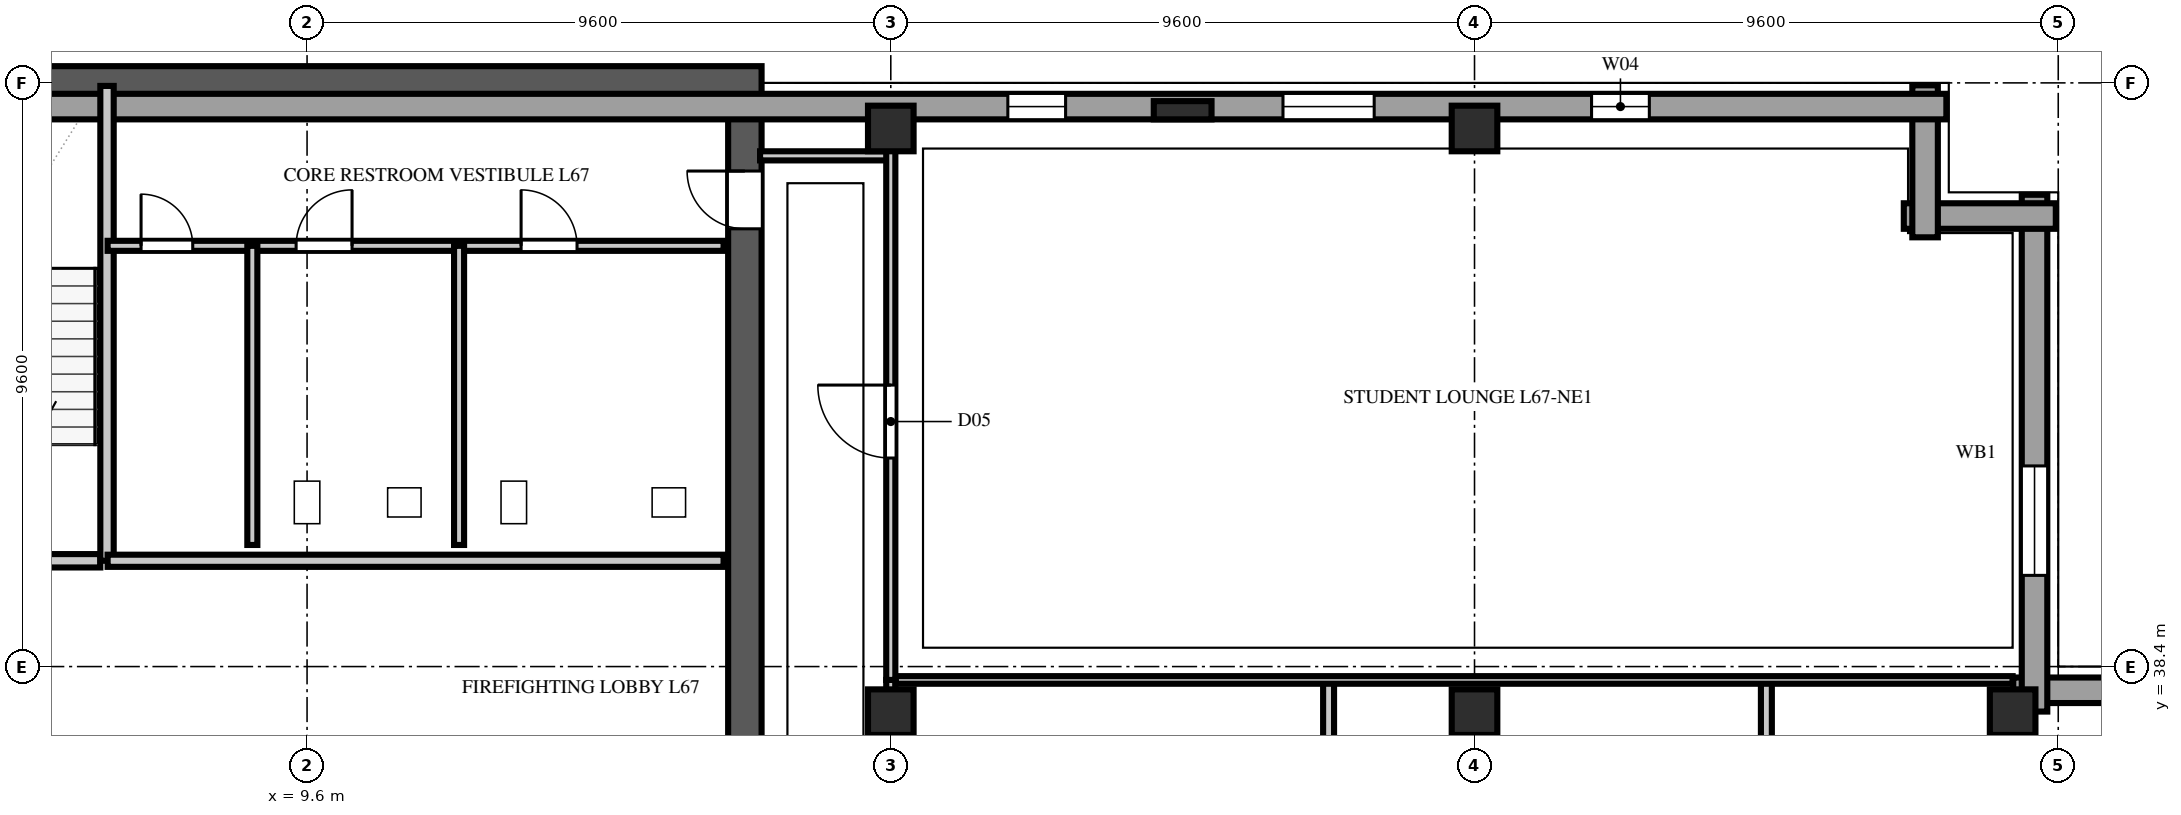
"""IFC4 building model, lengths in metres.
Left out: names, types, materials, properties, quantities, classifications, styles, units other than length and angle.
Written with IfcOpenShell. Run it as: python <this file> out.ifc"""

import sys

from ifc_helpers import new_model, si_unit, direction, frame, frame_2d, origin, origin_2d, place, context, subcontext, project, spatial, rectangle, extrude, element, fill, save


model = new_model("IFC4")
c1 = context("Model", 3, precision=1e-05, world=origin(), true_north=direction((0.0, 1.0)))
c2 = subcontext(c1, "Body", "Model", "MODEL_VIEW")
j1 = project(units=[si_unit("LENGTHUNIT", "METRE"), si_unit("PLANEANGLEUNIT", "RADIAN")], contexts=[c1])
p1 = place(None, origin())
s1 = spatial("IfcSite", under=j1, at=p1, CompositionType="ELEMENT")
p2 = place(p1, origin())
s2 = spatial("IfcBuilding", under=s1, at=p2, CompositionType="ELEMENT")
p3 = place(p2, frame((0.0, 0.0, 265.8)))
s3 = spatial("IfcBuildingStorey", under=s2, at=p3, CompositionType="ELEMENT", Elevation=265.8)
p4 = place(p3, frame((2.475, 48.0, 0.0), z_axis=(0.0, 0.0, 1.0), x_axis=(1.0, 0.0, 0.0)))
e1 = element("IfcWall", 1, at=p4, inside=s3, PredefinedType="SHEAR", context=c2, shape_type="SweptSolid", body=[
    extrude(rectangle(XDim=14.6, YDim=0.55, at=frame_2d((7.3, 0.0))), origin(), (0.0, 0.0, 1.0), 3.54),
])
p5 = place(p3, frame((16.8, 36.4, 0.0), z_axis=(0.0, 0.0, 1.0), x_axis=(0.0, 1.0, 0.0)))
e2 = element("IfcWall", 2, at=p5, inside=s3, PredefinedType="SHEAR", context=c2, shape_type="SweptSolid", body=[
    extrude(rectangle(XDim=11.325, YDim=0.55, at=frame_2d((5.663, 0.0))), origin(), (0.0, 0.0, 1.0), 3.54),
])
p6 = place(p5, frame((9.2, 0.0, 0.0)))
e3 = element("IfcOpeningElement", 3, at=p6, cuts=e2, PredefinedType="OPENING", context=c2, shape_type="SweptSolid", body=[
    extrude(rectangle(XDim=0.95, YDim=2.15, at=frame_2d((0.475, 1.075))), frame((0.0, 0.287, 0.0), z_axis=(0.0, -1.0, 0.0), x_axis=(1.0, 0.0, 0.0)), (0.0, 0.0, 1.0), 0.574),
])
for number, where, z_axis, x_axis in (
    (4, (19.2, 37.65, 0.0), (0.0, 0.0, 1.0), (1.0, 0.0, 0.0)),
    (5, (19.2, 47.25, 0.0), (0.0, 0.0, 1.0), (1.0, 0.0, 0.0)),
    (6, (28.8, 37.65, 0.0), (0.0, 0.0, 1.0), (1.0, 0.0, 0.0)),
    (7, (28.8, 47.25, 0.0), (0.0, 0.0, 1.0), (1.0, 0.0, 0.0)),
    (8, (37.65, 37.65, 0.0), (0.0, 0.0, 1.0), (1.0, 0.0, 0.0)),
):
    element("IfcColumn", number, at=place(p3, frame(where, z_axis=z_axis, x_axis=x_axis)), inside=s3, PredefinedType="COLUMN", context=c2, shape_type="SweptSolid", body=[
        extrude(rectangle(XDim=0.75, YDim=0.75, at=origin_2d()), origin(), (0.0, 0.0, 1.0), 3.8),
    ])
p7 = place(p3, frame((24.0, 47.55, 0.0), z_axis=(0.0, 0.0, 1.0), x_axis=(1.0, 0.0, 0.0)))
e9 = element("IfcColumn", 9, at=p7, inside=s3, PredefinedType="PILASTER", context=c2, shape_type="SweptSolid", body=[
    extrude(rectangle(XDim=0.95, YDim=0.3, at=origin_2d()), origin(), (0.0, 0.0, 1.0), 3.8),
])
p8 = place(p3, frame((46.16, 38.01, 0.0), z_axis=(0.0, 0.0, 1.0), x_axis=(-1.0, 0.0, 0.0)))
e10 = element("IfcWall", 10, at=p8, inside=s3, PredefinedType="SOLIDWALL", context=c2, shape_type="SweptSolid", body=[
    extrude(rectangle(XDim=8.5, YDim=0.42, at=frame_2d((4.25, 0.0))), origin(), (0.0, 0.0, 1.0), 3.54),
])
p9 = place(p8, frame((4.46, 0.0, 0.85)))
e11 = element("IfcOpeningElement", 11, at=p9, cuts=e10, PredefinedType="OPENING", context=c2, shape_type="SweptSolid", body=[
    extrude(rectangle(XDim=1.8, YDim=1.85, at=frame_2d((0.9, 0.925))), frame((0.0, 0.222, 0.0), z_axis=(0.0, -1.0, 0.0), x_axis=(1.0, 0.0, 0.0)), (0.0, 0.0, 1.0), 0.444),
])
p10 = place(p3, frame((38.01, 37.66, 0.0), z_axis=(0.0, 0.0, 1.0), x_axis=(0.0, 1.0, 0.0)))
e12 = element("IfcWall", 12, at=p10, inside=s3, PredefinedType="SOLIDWALL", context=c2, shape_type="SweptSolid", body=[
    extrude(rectangle(XDim=8.5, YDim=0.42, at=frame_2d((4.25, 0.0))), origin(), (0.0, 0.0, 1.0), 3.54),
])
p11 = place(p10, frame((2.24, 0.0, 0.85)))
e13 = element("IfcOpeningElement", 13, at=p11, cuts=e12, PredefinedType="OPENING", context=c2, shape_type="SweptSolid", body=[
    extrude(rectangle(XDim=1.8, YDim=1.85, at=frame_2d((0.9, 0.925))), frame((0.0, 0.222, 0.0), z_axis=(0.0, -1.0, 0.0), x_axis=(1.0, 0.0, 0.0)), (0.0, 0.0, 1.0), 0.444),
])
for number, where, z_axis, x_axis in (
    (14, (38.36, 45.81, 0.0), (0.0, 0.0, 1.0), (-1.0, 0.0, 0.0)),
    (15, (36.21, 45.46, 0.0), (0.0, 0.0, 1.0), (0.0, 1.0, 0.0)),
):
    element("IfcWall", number, at=place(p3, frame(where, z_axis=z_axis, x_axis=x_axis)), inside=s3, PredefinedType="SOLIDWALL", context=c2, shape_type="SweptSolid", body=[
        extrude(rectangle(XDim=2.5, YDim=0.42, at=frame_2d((1.25, 0.0))), origin(), (0.0, 0.0, 1.0), 3.54),
    ])
p12 = place(p3, frame((36.56, 47.61, 0.0), z_axis=(0.0, 0.0, 1.0), x_axis=(-1.0, 0.0, 0.0)))
e16 = element("IfcWall", 16, at=p12, inside=s3, PredefinedType="SOLIDWALL", context=c2, shape_type="SweptSolid", body=[
    extrude(rectangle(XDim=34.085, YDim=0.42, at=frame_2d((17.042, 0.0))), origin(), (0.0, 0.0, 1.0), 3.54),
])
p13 = place(p12, frame((4.885, 0.0, 0.9)))
e17 = element("IfcOpeningElement", 17, at=p13, cuts=e16, PredefinedType="OPENING", context=c2, shape_type="SweptSolid", body=[
    extrude(rectangle(XDim=0.95, YDim=1.85, at=frame_2d((0.475, 0.925))), frame((0.0, 0.222, 0.0), z_axis=(0.0, -1.0, 0.0), x_axis=(1.0, 0.0, 0.0)), (0.0, 0.0, 1.0), 0.444),
])
p14 = place(p12, frame((9.41, 0.0, 0.9)))
e18 = element("IfcOpeningElement", 18, at=p14, cuts=e16, PredefinedType="OPENING", context=c2, shape_type="SweptSolid", body=[
    extrude(rectangle(XDim=1.5, YDim=1.85, at=frame_2d((0.75, 0.925))), frame((0.0, 0.222, 0.0), z_axis=(0.0, -1.0, 0.0), x_axis=(1.0, 0.0, 0.0)), (0.0, 0.0, 1.0), 0.444),
])
p15 = place(p12, frame((14.485, 0.0, 0.9)))
e19 = element("IfcOpeningElement", 19, at=p15, cuts=e16, PredefinedType="OPENING", context=c2, shape_type="SweptSolid", body=[
    extrude(rectangle(XDim=0.95, YDim=1.85, at=frame_2d((0.475, 0.925))), frame((0.0, 0.222, 0.0), z_axis=(0.0, -1.0, 0.0), x_axis=(1.0, 0.0, 0.0)), (0.0, 0.0, 1.0), 0.444),
])
p16 = place(p3, frame((2.65, 40.14, 0.0), z_axis=(0.0, 0.0, 1.0), x_axis=(1.0, 0.0, 0.0)))
e20 = element("IfcWall", 20, at=p16, inside=s3, PredefinedType="SOLIDWALL", context=c2, shape_type="SweptSolid", body=[
    extrude(rectangle(XDim=3.55, YDim=0.22, at=frame_2d((1.775, 0.0))), origin(), (0.0, 0.0, 1.0), 3.54),
])
p17 = place(p16, frame((1.2, 0.0, 0.0)))
e21 = element("IfcOpeningElement", 21, at=p17, cuts=e20, PredefinedType="OPENING", context=c2, shape_type="SweptSolid", body=[
    extrude(rectangle(XDim=1.1, YDim=2.2, at=frame_2d((0.55, 1.1))), frame((0.0, 0.122, 0.0), z_axis=(0.0, -1.0, 0.0), x_axis=(1.0, 0.0, 0.0)), (0.0, 0.0, 1.0), 0.244),
])
p18 = place(p3, frame((6.31, 40.14, 0.0), z_axis=(0.0, 0.0, 1.0), x_axis=(0.0, 1.0, 0.0)))
e22 = element("IfcWall", 22, at=p18, inside=s3, PredefinedType="SOLIDWALL", context=c2, shape_type="SweptSolid", body=[
    extrude(rectangle(XDim=7.81, YDim=0.22, at=frame_2d((3.905, 0.0))), origin(), (0.0, 0.0, 1.0), 3.54),
])
p19 = place(p3, frame((6.32, 40.14, 0.0), z_axis=(0.0, 0.0, 1.0), x_axis=(1.0, 0.0, 0.0)))
e23 = element("IfcWall", 23, at=p19, inside=s3, PredefinedType="SOLIDWALL", context=c2, shape_type="SweptSolid", body=[
    extrude(rectangle(XDim=10.13, YDim=0.2, at=frame_2d((5.065, 0.0))), origin(), (0.0, 0.0, 1.0), 3.54),
])
p20 = place(p3, frame((6.32, 45.32, 0.0), z_axis=(0.0, 0.0, 1.0), x_axis=(1.0, 0.0, 0.0)))
e24 = element("IfcWall", 24, at=p20, inside=s3, PredefinedType="PLUMBINGWALL", context=c2, shape_type="SweptSolid", body=[
    extrude(rectangle(XDim=10.13, YDim=0.165, at=frame_2d((5.065, 0.0))), origin(), (0.0, 0.0, 1.0), 3.54),
])
p21 = place(p20, frame((0.55, 0.0, 0.0)))
e25 = element("IfcOpeningElement", 25, at=p21, cuts=e24, PredefinedType="OPENING", context=c2, shape_type="SweptSolid", body=[
    extrude(rectangle(XDim=0.85, YDim=2.1, at=frame_2d((0.425, 1.05))), frame((0.0, 0.094, 0.0), z_axis=(0.0, -1.0, 0.0), x_axis=(1.0, 0.0, 0.0)), (0.0, 0.0, 1.0), 0.189),
])
p22 = place(p20, frame((3.1, 0.0, 0.0)))
e26 = element("IfcOpeningElement", 26, at=p22, cuts=e24, PredefinedType="OPENING", context=c2, shape_type="SweptSolid", body=[
    extrude(rectangle(XDim=0.92, YDim=2.15, at=frame_2d((0.46, 1.075))), frame((0.0, 0.094, 0.0), z_axis=(0.0, -1.0, 0.0), x_axis=(1.0, 0.0, 0.0)), (0.0, 0.0, 1.0), 0.189),
])
p23 = place(p20, frame((6.8, 0.0, 0.0)))
e27 = element("IfcOpeningElement", 27, at=p23, cuts=e24, PredefinedType="OPENING", context=c2, shape_type="SweptSolid", body=[
    extrude(rectangle(XDim=0.92, YDim=2.15, at=frame_2d((0.46, 1.075))), frame((0.0, 0.094, 0.0), z_axis=(0.0, -1.0, 0.0), x_axis=(1.0, 0.0, 0.0)), (0.0, 0.0, 1.0), 0.189),
])
for number, where, z_axis, x_axis in (
    (28, (8.7, 40.4, 0.0), (0.0, 0.0, 1.0), (0.0, 1.0, 0.0)),
    (29, (12.1, 40.4, 0.0), (0.0, 0.0, 1.0), (0.0, 1.0, 0.0)),
):
    element("IfcWall", number, at=place(p3, frame(where, z_axis=z_axis, x_axis=x_axis)), inside=s3, PredefinedType="PLUMBINGWALL", context=c2, shape_type="SweptSolid", body=[
        extrude(rectangle(XDim=4.92, YDim=0.165, at=frame_2d((2.46, 0.0))), origin(), (0.0, 0.0, 1.0), 3.54),
    ])
p24 = place(p3, frame((17.05, 46.8, 0.0), z_axis=(0.0, 0.0, 1.0), x_axis=(1.0, 0.0, 0.0)))
e30 = element("IfcWall", 30, at=p24, inside=s3, PredefinedType="PARTITIONING", context=c2, shape_type="SweptSolid", body=[
    extrude(rectangle(XDim=2.15, YDim=0.15, at=frame_2d((1.075, 0.0))), origin(), (0.0, 0.0, 1.0), 3.54),
])
for number, where, z_axis, x_axis in (
    (31, (26.4, 20.95, 0.0), (0.0, 0.0, 1.0), (0.0, 1.0, 0.0)),
    (32, (33.6, 20.95, 0.0), (0.0, 0.0, 1.0), (0.0, 1.0, 0.0)),
):
    element("IfcWall", number, at=place(p3, frame(where, z_axis=z_axis, x_axis=x_axis)), inside=s3, PredefinedType="PARTITIONING", context=c2, shape_type="SweptSolid", body=[
        extrude(rectangle(XDim=17.23, YDim=0.18, at=frame_2d((8.615, 0.0))), origin(), (0.0, 0.0, 1.0), 3.54),
    ])
p25 = place(p3, frame((19.2, 20.95, 0.0), z_axis=(0.0, 0.0, 1.0), x_axis=(0.0, 1.0, 0.0)))
e33 = element("IfcWall", 33, at=p25, inside=s3, PredefinedType="PARTITIONING", context=c2, shape_type="SweptSolid", body=[
    extrude(rectangle(XDim=17.23, YDim=0.15, at=frame_2d((8.615, 0.0))), origin(), (0.0, 0.0, 1.0), 3.123),
])
p26 = place(p3, frame((19.28, 38.18, 0.0), z_axis=(0.0, 0.0, 1.0), x_axis=(1.0, 0.0, 0.0)))
e34 = element("IfcWall", 34, at=p26, inside=s3, PredefinedType="PARTITIONING", context=c2, shape_type="SweptSolid", body=[
    extrude(rectangle(XDim=18.37, YDim=0.125, at=frame_2d((9.185, 0.0))), origin(), (0.0, 0.0, 1.0), 3.54),
])
p27 = place(p3, frame((19.2, 38.18, 0.0), z_axis=(0.0, 0.0, 1.0), x_axis=(0.0, 1.0, 0.0)))
e35 = element("IfcWall", 35, at=p27, inside=s3, PredefinedType="PARTITIONING", context=c2, shape_type="SweptSolid", body=[
    extrude(rectangle(XDim=9.27, YDim=0.15, at=frame_2d((4.635, 0.0))), origin(), (0.0, 0.0, 1.0), 3.123),
])
p28 = place(p27, frame((3.65, 0.0, 0.0)))
e36 = element("IfcOpeningElement", 36, at=p28, cuts=e35, PredefinedType="OPENING", context=c2, shape_type="SweptSolid", body=[
    extrude(rectangle(XDim=1.2, YDim=2.2, at=frame_2d((0.6, 1.1))), frame((0.0, 0.087, 0.0), z_axis=(0.0, -1.0, 0.0), x_axis=(1.0, 0.0, 0.0)), (0.0, 0.0, 1.0), 0.174),
])
p29 = place(p11, origin())
e37 = element("IfcWindow", 37, at=p29, inside=s3, PartitioningType="DOUBLE_PANEL_VERTICAL", PredefinedType="WINDOW", context=c2, shape_type="SweptSolid", body=[
    extrude(rectangle(XDim=1.8, YDim=1.85, at=frame_2d((0.9, 0.925))), frame((0.0, 0.11, 0.0), z_axis=(0.0, -1.0, 0.0), x_axis=(1.0, 0.0, 0.0)), (0.0, 0.0, 1.0), 0.06),
])
fill(e13, e37)
p30 = place(p13, origin())
e38 = element("IfcWindow", 38, at=p30, inside=s3, PartitioningType="SINGLE_PANEL", PredefinedType="WINDOW", context=c2, shape_type="SweptSolid", body=[
    extrude(rectangle(XDim=0.95, YDim=1.85, at=frame_2d((0.475, 0.925))), frame((0.0, 0.11, 0.0), z_axis=(0.0, -1.0, 0.0), x_axis=(1.0, 0.0, 0.0)), (0.0, 0.0, 1.0), 0.06),
])
fill(e17, e38)
p31 = place(p14, origin())
e39 = element("IfcWindow", 39, at=p31, inside=s3, PartitioningType="DOUBLE_PANEL_VERTICAL", PredefinedType="WINDOW", context=c2, shape_type="SweptSolid", body=[
    extrude(rectangle(XDim=1.5, YDim=1.85, at=frame_2d((0.75, 0.925))), frame((0.0, 0.11, 0.0), z_axis=(0.0, -1.0, 0.0), x_axis=(1.0, 0.0, 0.0)), (0.0, 0.0, 1.0), 0.06),
])
fill(e18, e39)
p32 = place(p15, origin())
e40 = element("IfcWindow", 40, at=p32, inside=s3, PartitioningType="SINGLE_PANEL", PredefinedType="WINDOW", context=c2, shape_type="SweptSolid", body=[
    extrude(rectangle(XDim=0.95, YDim=1.85, at=frame_2d((0.475, 0.925))), frame((0.0, 0.11, 0.0), z_axis=(0.0, -1.0, 0.0), x_axis=(1.0, 0.0, 0.0)), (0.0, 0.0, 1.0), 0.06),
])
fill(e19, e40)
p33 = place(p6, origin())
e41 = element("IfcDoor", 41, at=p33, inside=s3, OperationType="SINGLE_SWING_RIGHT", PredefinedType="DOOR", context=c2, shape_type="SweptSolid", body=[
    extrude(rectangle(XDim=0.95, YDim=2.15, at=frame_2d((0.475, 1.075))), frame((0.0, 0.025, 0.0), z_axis=(0.0, -1.0, 0.0), x_axis=(1.0, 0.0, 0.0)), (0.0, 0.0, 1.0), 0.05),
])
fill(e3, e41)
p34 = place(p21, origin())
e42 = element("IfcDoor", 42, at=p34, inside=s3, OperationType="SINGLE_SWING_LEFT", PredefinedType="DOOR", context=c2, shape_type="SweptSolid", body=[
    extrude(rectangle(XDim=0.85, YDim=2.1, at=frame_2d((0.425, 1.05))), frame((0.0, 0.025, 0.0), z_axis=(0.0, -1.0, 0.0), x_axis=(1.0, 0.0, 0.0)), (0.0, 0.0, 1.0), 0.05),
])
fill(e25, e42)
p35 = place(p22, origin())
e43 = element("IfcDoor", 43, at=p35, inside=s3, OperationType="SINGLE_SWING_RIGHT", PredefinedType="DOOR", context=c2, shape_type="SweptSolid", body=[
    extrude(rectangle(XDim=0.92, YDim=2.15, at=frame_2d((0.46, 1.075))), frame((0.0, 0.025, 0.0), z_axis=(0.0, -1.0, 0.0), x_axis=(1.0, 0.0, 0.0)), (0.0, 0.0, 1.0), 0.05),
])
fill(e26, e43)
p36 = place(p23, origin())
e44 = element("IfcDoor", 44, at=p36, inside=s3, OperationType="SINGLE_SWING_LEFT", PredefinedType="DOOR", context=c2, shape_type="SweptSolid", body=[
    extrude(rectangle(XDim=0.92, YDim=2.15, at=frame_2d((0.46, 1.075))), frame((0.0, 0.025, 0.0), z_axis=(0.0, -1.0, 0.0), x_axis=(1.0, 0.0, 0.0)), (0.0, 0.0, 1.0), 0.05),
])
fill(e27, e44)
p37 = place(p28, origin())
e45 = element("IfcDoor", 45, at=p37, inside=s3, OperationType="SINGLE_SWING_RIGHT", PredefinedType="DOOR", context=c2, shape_type="SweptSolid", body=[
    extrude(rectangle(XDim=1.2, YDim=2.2, at=frame_2d((0.6, 1.1))), frame((0.0, 0.025, 0.0), z_axis=(0.0, -1.0, 0.0), x_axis=(1.0, 0.0, 0.0)), (0.0, 0.0, 1.0), 0.05),
])
fill(e36, e45)
save(model, sys.argv[1])
